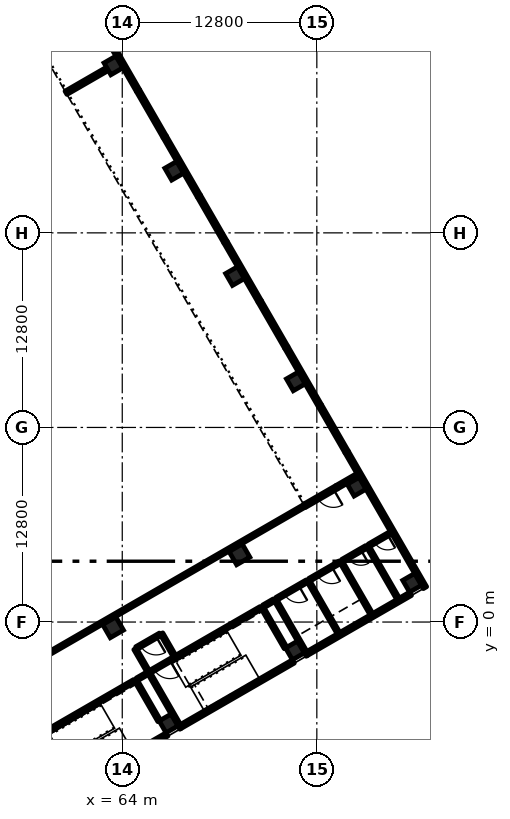
"""IFC4 building model, lengths in metres.
Left out: names, types, materials, properties, quantities, classifications, styles, units other than length and angle.
Written with IfcOpenShell. Run it as: python <this file> out.ifc"""

import sys

from ifc_helpers import new_model, si_unit, direction, frame, frame_2d, origin, origin_2d, place, context, subcontext, project, spatial, rectangle, extrude, element, fill, save


model = new_model("IFC4")
c1 = context("Model", 3, precision=1e-05, world=origin(), true_north=direction((0.0, 1.0)))
c2 = subcontext(c1, "Body", "Model", "MODEL_VIEW")
j1 = project(units=[si_unit("LENGTHUNIT", "METRE"), si_unit("PLANEANGLEUNIT", "RADIAN")], contexts=[c1])
p1 = place(None, origin())
s1 = spatial("IfcSite", under=j1, at=p1, CompositionType="ELEMENT")
p2 = place(p1, origin())
s2 = spatial("IfcBuilding", under=s1, at=p2, CompositionType="ELEMENT")
p3 = place(p2, frame((0.0, 0.0, 11.4)))
s3 = spatial("IfcBuildingStorey", under=s2, at=p3, CompositionType="ELEMENT", Elevation=11.4)
for number, where, z_axis, x_axis in (
    (1, (67.046, -6.671, 0.0), (0.0, 0.0, 1.0), (-0.5, 0.866, 0.0)),
    (2, (75.36, -1.871, 0.0), (0.0, 0.0, 1.0), (-0.5, 0.866, 0.0)),
    (3, (83.067, 2.579, 0.0), (0.0, 0.0, 1.0), (-0.5, 0.866, 0.0)),
):
    element("IfcColumn", number, at=place(p3, frame(where, z_axis=z_axis, x_axis=x_axis)), inside=s3, PredefinedType="COLUMN", context=c2, shape_type="SweptSolid", body=[
        extrude(rectangle(XDim=0.9, YDim=0.9, at=origin_2d()), origin(), (0.0, 0.0, 1.0), 4.8),
    ])
for number, where, z_axis, x_axis in (
    (4, (63.396, -0.349, 0.0), (0.0, 0.0, 1.0), (-0.5, 0.866, 0.0)),
    (5, (71.71, 4.451, 0.0), (0.0, 0.0, 1.0), (-0.5, 0.866, 0.0)),
):
    element("IfcColumn", number, at=place(p3, frame(where, z_axis=z_axis, x_axis=x_axis)), inside=s3, PredefinedType="COLUMN", context=c2, shape_type="SweptSolid", body=[
        extrude(rectangle(XDim=1.0, YDim=1.0, at=origin_2d()), origin(), (0.0, 0.0, 1.0), 4.8),
    ])
for number, where, z_axis, x_axis in (
    (6, (79.417, 8.901, 0.0), (0.0, 0.0, 1.0), (-0.5, 0.866, 0.0)),
    (7, (75.417, 15.829, 0.0), (0.0, 0.0, 1.0), (-0.5, 0.866, 0.0)),
    (8, (71.417, 22.758, 0.0), (0.0, 0.0, 1.0), (-0.5, 0.866, 0.0)),
    (9, (67.417, 29.686, 0.0), (0.0, 0.0, 1.0), (-0.5, 0.866, 0.0)),
    (10, (63.417, 36.614, 0.0), (0.0, 0.0, 1.0), (-0.5, 0.866, 0.0)),
):
    element("IfcColumn", number, at=place(p3, frame(where, z_axis=z_axis, x_axis=x_axis)), inside=s3, PredefinedType="COLUMN", context=c2, shape_type="SweptSolid", body=[
        extrude(rectangle(XDim=0.9, YDim=0.9, at=origin_2d()), origin(), (0.0, 0.0, 1.0), 4.8),
    ])
p4 = place(p2, frame((0.0, 0.0, 6.0)))
s4 = spatial("IfcBuildingStorey", under=s2, at=p4, CompositionType="ELEMENT", Elevation=6.0)
p5 = place(p4, frame((26.178, 15.114, 0.0), z_axis=(0.0, 0.0, 1.0), x_axis=(0.866025540551, 0.499999763114, 0.0)))
e11 = element("IfcWall", 11, at=p5, inside=s4, PredefinedType="SOLIDWALL", context=c2, shape_type="SweptSolid", body=[
    extrude(rectangle(XDim=39.4, YDim=0.25, at=frame_2d((19.7, 0.0))), origin(), (0.0, 0.0, 1.0), 10.2),
])
p6 = place(p3, frame((78.759, 11.191, 0.0), z_axis=(0.0, 0.0, 1.0), x_axis=(0.500001855621, -0.866024332438, 0.0)))
e12 = element("IfcWall", 12, at=p6, inside=s3, PredefinedType="SOLIDWALL", context=c2, shape_type="SweptSolid", body=[
    extrude(rectangle(XDim=10.312, YDim=0.25, at=frame_2d((5.156, 0.0))), origin(), (0.0, 0.0, 1.0), 4.5),
])
p7 = place(p3, frame((77.009, 14.222, 0.0), z_axis=(0.0, 0.0, 1.0), x_axis=(0.500010275428, -0.866019471182, 0.0)))
e13 = element("IfcWall", 13, at=p7, inside=s3, PredefinedType="SOLIDWALL", context=c2, shape_type="SweptSolid", body=[
    extrude(rectangle(XDim=3.5, YDim=0.25, at=frame_2d((1.75, 0.0))), origin(), (0.0, 0.0, 1.0), 4.5),
])
p8 = place(p7, frame((0.25, 0.0, 0.9)))
e14 = element("IfcOpeningElement", 14, at=p8, cuts=e13, PredefinedType="OPENING", context=c2, shape_type="SweptSolid", body=[
    extrude(rectangle(XDim=3.0, YDim=2.2, at=frame_2d((1.5, 1.1))), frame((0.0, 0.135, 0.0), z_axis=(0.0, -1.0, 0.0), x_axis=(1.0, 0.0, 0.0)), (0.0, 0.0, 1.0), 0.27),
])
p9 = place(p3, frame((74.79, 18.065, 0.0), z_axis=(0.0, 0.0, 1.0), x_axis=(0.499990705068, -0.866030770149, 0.0)))
e15 = element("IfcWall", 15, at=p9, inside=s3, PredefinedType="SOLIDWALL", context=c2, shape_type="SweptSolid", body=[
    extrude(rectangle(XDim=4.438, YDim=0.25, at=frame_2d((2.219, 0.0))), origin(), (0.0, 0.0, 1.0), 4.5),
])
p10 = place(p3, frame((73.04, 21.097, 0.0), z_axis=(0.0, 0.0, 1.0), x_axis=(0.499980071345, -0.866036909293, 0.0)))
e16 = element("IfcWall", 16, at=p10, inside=s3, PredefinedType="SOLIDWALL", context=c2, shape_type="SweptSolid", body=[
    extrude(rectangle(XDim=3.5, YDim=0.25, at=frame_2d((1.75, 0.0))), origin(), (0.0, 0.0, 1.0), 4.5),
])
p11 = place(p10, frame((0.25, 0.0, 0.9)))
e17 = element("IfcOpeningElement", 17, at=p11, cuts=e16, PredefinedType="OPENING", context=c2, shape_type="SweptSolid", body=[
    extrude(rectangle(XDim=3.0, YDim=2.2, at=frame_2d((1.5, 1.1))), frame((0.0, 0.135, 0.0), z_axis=(0.0, -1.0, 0.0), x_axis=(1.0, 0.0, 0.0)), (0.0, 0.0, 1.0), 0.27),
])
p12 = place(p3, frame((70.79, 24.994, 0.0), z_axis=(0.0, 0.0, 1.0), x_axis=(0.500013631625, -0.866017533419, 0.0)))
e18 = element("IfcWall", 18, at=p12, inside=s3, PredefinedType="SOLIDWALL", context=c2, shape_type="SweptSolid", body=[
    extrude(rectangle(XDim=4.5, YDim=0.25, at=frame_2d((2.25, 0.0))), origin(), (0.0, 0.0, 1.0), 4.5),
])
p13 = place(p3, frame((69.04, 28.025, 0.0), z_axis=(0.0, 0.0, 1.0), x_axis=(0.499980071345, -0.866036909293, 0.0)))
e19 = element("IfcWall", 19, at=p13, inside=s3, PredefinedType="SOLIDWALL", context=c2, shape_type="SweptSolid", body=[
    extrude(rectangle(XDim=3.5, YDim=0.25, at=frame_2d((1.75, 0.0))), origin(), (0.0, 0.0, 1.0), 4.5),
])
p14 = place(p13, frame((0.25, 0.0, 0.9)))
e20 = element("IfcOpeningElement", 20, at=p14, cuts=e19, PredefinedType="OPENING", context=c2, shape_type="SweptSolid", body=[
    extrude(rectangle(XDim=3.0, YDim=2.2, at=frame_2d((1.5, 1.1))), frame((0.0, 0.135, 0.0), z_axis=(0.0, -1.0, 0.0), x_axis=(1.0, 0.0, 0.0)), (0.0, 0.0, 1.0), 0.27),
])
p15 = place(p3, frame((66.79, 31.922, 0.0), z_axis=(0.0, 0.0, 1.0), x_axis=(0.500013631625, -0.866017533419, 0.0)))
e21 = element("IfcWall", 21, at=p15, inside=s3, PredefinedType="SOLIDWALL", context=c2, shape_type="SweptSolid", body=[
    extrude(rectangle(XDim=4.5, YDim=0.25, at=frame_2d((2.25, 0.0))), origin(), (0.0, 0.0, 1.0), 4.5),
])
p16 = place(p3, frame((65.04, 34.953, 0.0), z_axis=(0.0, 0.0, 1.0), x_axis=(0.500010275428, -0.866019471182, 0.0)))
e22 = element("IfcWall", 22, at=p16, inside=s3, PredefinedType="SOLIDWALL", context=c2, shape_type="SweptSolid", body=[
    extrude(rectangle(XDim=3.5, YDim=0.25, at=frame_2d((1.75, 0.0))), origin(), (0.0, 0.0, 1.0), 4.5),
])
p17 = place(p16, frame((0.25, 0.0, 0.9)))
e23 = element("IfcOpeningElement", 23, at=p17, cuts=e22, PredefinedType="OPENING", context=c2, shape_type="SweptSolid", body=[
    extrude(rectangle(XDim=3.0, YDim=2.2, at=frame_2d((1.5, 1.1))), frame((0.0, 0.135, 0.0), z_axis=(0.0, -1.0, 0.0), x_axis=(1.0, 0.0, 0.0)), (0.0, 0.0, 1.0), 0.27),
])
p18 = place(p3, frame((62.79, 38.85, 0.0), z_axis=(0.0, 0.0, 1.0), x_axis=(0.499990139034, -0.866031096941, 0.0)))
e24 = element("IfcWall", 24, at=p18, inside=s3, PredefinedType="SOLIDWALL", context=c2, shape_type="SweptSolid", body=[
    extrude(rectangle(XDim=4.5, YDim=0.25, at=frame_2d((2.25, 0.0))), origin(), (0.0, 0.0, 1.0), 4.5),
])
p19 = place(p3, frame((66.944, -7.394, 0.0), z_axis=(0.0, 0.0, 1.0), x_axis=(-0.866033360935, -0.499986217557, 0.0)))
e25 = element("IfcWall", 25, at=p19, inside=s3, PredefinedType="SOLIDWALL", context=c2, shape_type="SweptSolid", body=[
    extrude(rectangle(XDim=8.6, YDim=0.25, at=frame_2d((4.3, 0.0))), origin(), (0.0, 0.0, 1.0), 4.5),
])
p20 = place(p3, frame((75.258, -2.594, 0.0), z_axis=(0.0, 0.0, 1.0), x_axis=(-0.866028165386, -0.499995216735, 0.0)))
e26 = element("IfcWall", 26, at=p20, inside=s3, PredefinedType="SOLIDWALL", context=c2, shape_type="SweptSolid", body=[
    extrude(rectangle(XDim=8.6, YDim=0.25, at=frame_2d((4.3, 0.0))), origin(), (0.0, 0.0, 1.0), 4.5),
])
p21 = place(p3, frame((82.965, 1.856, 0.0), z_axis=(0.0, 0.0, 1.0), x_axis=(-0.866026562566, -0.499997992926, 0.0)))
e27 = element("IfcWall", 27, at=p21, inside=s3, PredefinedType="SOLIDWALL", context=c2, shape_type="SweptSolid", body=[
    extrude(rectangle(XDim=7.9, YDim=0.25, at=frame_2d((3.95, 0.0))), origin(), (0.0, 0.0, 1.0), 4.5),
])
p22 = place(p3, frame((67.81, -6.894, 0.0), z_axis=(0.0, 0.0, 1.0), x_axis=(-0.867038199201, -0.4982416694, 0.0)))
e28 = element("IfcWall", 28, at=p22, inside=s3, PredefinedType="SOLIDWALL", context=c2, shape_type="SweptSolid", body=[
    extrude(rectangle(XDim=0.1, YDim=0.25, at=frame_2d((0.05, 0.0))), origin(), (0.0, 0.0, 1.0), 4.5),
])
p23 = place(p3, frame((76.124, -2.094, 0.0), z_axis=(0.0, 0.0, 1.0), x_axis=(-0.865982457891, -0.500074377092, 0.0)))
e29 = element("IfcWall", 29, at=p23, inside=s3, PredefinedType="SOLIDWALL", context=c2, shape_type="SweptSolid", body=[
    extrude(rectangle(XDim=0.1, YDim=0.25, at=frame_2d((0.05, 0.0))), origin(), (0.0, 0.0, 1.0), 4.5),
])
p24 = place(p3, frame((66.431, -6.506, 0.0), z_axis=(0.0, 0.0, 1.0), x_axis=(-0.49999285859, 0.86602952684, 0.0)))
e30 = element("IfcWall", 30, at=p24, inside=s3, PredefinedType="SOLIDWALL", context=c2, shape_type="SweptSolid", body=[
    extrude(rectangle(XDim=3.1, YDim=0.2, at=frame_2d((1.55, 0.0))), origin(), (0.0, 0.0, 1.0), 4.5),
])
p25 = place(p3, frame((67.747, -6.785, 0.0), z_axis=(0.0, 0.0, 1.0), x_axis=(-0.49999894854, 0.866026010844, 0.0)))
e31 = element("IfcWall", 31, at=p25, inside=s3, PredefinedType="SOLIDWALL", context=c2, shape_type="SweptSolid", body=[
    extrude(rectangle(XDim=4.0, YDim=0.2, at=frame_2d((2.0, 0.0))), origin(), (0.0, 0.0, 1.0), 4.5),
])
p26 = place(p3, frame((74.745, -1.706, 0.0), z_axis=(0.0, 0.0, 1.0), x_axis=(-0.500026960575, 0.86600983753, 0.0)))
e32 = element("IfcWall", 32, at=p26, inside=s3, PredefinedType="SOLIDWALL", context=c2, shape_type="SweptSolid", body=[
    extrude(rectangle(XDim=3.1, YDim=0.2, at=frame_2d((1.55, 0.0))), origin(), (0.0, 0.0, 1.0), 4.5),
])
p27 = place(p3, frame((59.035, -7.196, 0.0), z_axis=(0.0, 0.0, 1.0), x_axis=(0.866027239912, 0.49999681972, 0.0)))
e33 = element("IfcWall", 33, at=p27, inside=s3, PredefinedType="SOLIDWALL", context=c2, shape_type="SweptSolid", body=[
    extrude(rectangle(XDim=6.65, YDim=0.2, at=frame_2d((3.325, 0.0))), origin(), (0.0, 0.0, 1.0), 4.5),
])
p28 = place(p3, frame((67.349, -2.396, 0.0), z_axis=(0.0, 0.0, 1.0), x_axis=(-0.866036909293, -0.499980071345, 0.0)))
e34 = element("IfcWall", 34, at=p28, inside=s3, PredefinedType="SOLIDWALL", context=c2, shape_type="SweptSolid", body=[
    extrude(rectangle(XDim=1.75, YDim=0.2, at=frame_2d((0.875, 0.0))), origin(), (0.0, 0.0, 1.0), 4.5),
])
p29 = place(p28, frame((0.25, 0.0, 0.0)))
e35 = element("IfcOpeningElement", 35, at=p29, cuts=e34, PredefinedType="OPENING", context=c2, shape_type="SweptSolid", body=[
    extrude(rectangle(XDim=1.2, YDim=2.1, at=frame_2d((0.6, 1.05))), frame((0.0, 0.11, 0.0), z_axis=(0.0, -1.0, 0.0), x_axis=(1.0, 0.0, 0.0)), (0.0, 0.0, 1.0), 0.22),
])
p30 = place(p3, frame((67.349, -2.396, 0.0), z_axis=(0.0, 0.0, 1.0), x_axis=(0.86601134256, 0.500024353964, 0.0)))
e36 = element("IfcWall", 36, at=p30, inside=s3, PredefinedType="SOLIDWALL", context=c2, shape_type="SweptSolid", body=[
    extrude(rectangle(XDim=6.65, YDim=0.2, at=frame_2d((3.325, 0.0))), origin(), (0.0, 0.0, 1.0), 4.5),
])
for number, where, z_axis, x_axis in (
    (37, (76.061, -1.986, 0.0), (0.0, 0.0, 1.0), (-0.5, 0.866, 0.0)),
    (38, (78.226, -0.736, 0.0), (0.0, 0.0, 1.0), (-0.5, 0.866, 0.0)),
    (39, (80.391, 0.514, 0.0), (0.0, 0.0, 1.0), (-0.5, 0.866, 0.0)),
):
    element("IfcWall", number, at=place(p3, frame(where, z_axis=z_axis, x_axis=x_axis)), inside=s3, PredefinedType="SOLIDWALL", context=c2, shape_type="SweptSolid", body=[
        extrude(rectangle(XDim=4.0, YDim=0.2, at=frame_2d((2.0, 0.0))), origin(), (0.0, 0.0, 1.0), 4.5),
    ])
p31 = place(p3, frame((76.139, 2.679, 0.0), z_axis=(0.0, 0.0, 1.0), x_axis=(-0.865980515519, -0.500077740698, 0.0)))
e40 = element("IfcWall", 40, at=p31, inside=s3, PredefinedType="SOLIDWALL", context=c2, shape_type="SweptSolid", body=[
    extrude(rectangle(XDim=2.3, YDim=0.2, at=frame_2d((1.15, 0.0))), origin(), (0.0, 0.0, 1.0), 4.5),
])
p32 = place(p31, frame((0.6, 0.0, 0.0)))
e41 = element("IfcOpeningElement", 41, at=p32, cuts=e40, PredefinedType="OPENING", context=c2, shape_type="SweptSolid", body=[
    extrude(rectangle(XDim=1.1, YDim=2.1, at=frame_2d((0.55, 1.05))), frame((0.0, 0.11, 0.0), z_axis=(0.0, -1.0, 0.0), x_axis=(1.0, 0.0, 0.0)), (0.0, 0.0, 1.0), 0.22),
])
p33 = place(p3, frame((78.304, 3.929, 0.0), z_axis=(0.0, 0.0, 1.0), x_axis=(-0.865980515519, -0.500077740698, 0.0)))
e42 = element("IfcWall", 42, at=p33, inside=s3, PredefinedType="SOLIDWALL", context=c2, shape_type="SweptSolid", body=[
    extrude(rectangle(XDim=2.3, YDim=0.2, at=frame_2d((1.15, 0.0))), origin(), (0.0, 0.0, 1.0), 4.5),
])
p34 = place(p33, frame((0.6, 0.0, 0.0)))
e43 = element("IfcOpeningElement", 43, at=p34, cuts=e42, PredefinedType="OPENING", context=c2, shape_type="SweptSolid", body=[
    extrude(rectangle(XDim=1.1, YDim=2.1, at=frame_2d((0.55, 1.05))), frame((0.0, 0.11, 0.0), z_axis=(0.0, -1.0, 0.0), x_axis=(1.0, 0.0, 0.0)), (0.0, 0.0, 1.0), 0.22),
])
p35 = place(p3, frame((65.697, -3.235, 0.0), z_axis=(0.0, 0.0, 1.0), x_axis=(-0.499892348375, 0.866087547558, 0.0)))
e44 = element("IfcWall", 44, at=p35, inside=s3, PredefinedType="PARTITIONING", context=c2, shape_type="SweptSolid", body=[
    extrude(rectangle(XDim=1.7, YDim=0.2, at=frame_2d((0.85, 0.0))), origin(), (0.0, 0.0, 1.0), 3.9),
])
p36 = place(p3, frame((67.429, -2.235, 0.0), z_axis=(0.0, 0.0, 1.0), x_axis=(-0.500000056704, 0.866025371046, 0.0)))
e45 = element("IfcWall", 45, at=p36, inside=s3, PredefinedType="PARTITIONING", context=c2, shape_type="SweptSolid", body=[
    extrude(rectangle(XDim=1.7, YDim=0.2, at=frame_2d((0.85, 0.0))), origin(), (0.0, 0.0, 1.0), 3.9),
])
p37 = place(p3, frame((66.493, -0.812, 0.0), z_axis=(0.0, 0.0, 1.0), x_axis=(-0.866081705922, -0.499902469156, 0.0)))
e46 = element("IfcWall", 46, at=p37, inside=s3, PredefinedType="PARTITIONING", context=c2, shape_type="SweptSolid", body=[
    extrude(rectangle(XDim=1.8, YDim=0.2, at=frame_2d((0.9, 0.0))), origin(), (0.0, 0.0, 1.0), 3.9),
])
p38 = place(p37, frame((0.3, 0.0, 0.0)))
e47 = element("IfcOpeningElement", 47, at=p38, cuts=e46, PredefinedType="OPENING", context=c2, shape_type="SweptSolid", body=[
    extrude(rectangle(XDim=1.2, YDim=2.1, at=frame_2d((0.6, 1.05))), frame((0.0, 0.11, 0.0), z_axis=(0.0, -1.0, 0.0), x_axis=(1.0, 0.0, 0.0)), (0.0, 0.0, 1.0), 0.22),
])
p39 = place(p3, frame((78.109, 8.867, 0.0), z_axis=(0.0, 0.0, 1.0), x_axis=(-0.866057815567, -0.499943856944, 0.0)))
e48 = element("IfcWall", 48, at=p39, inside=s3, PredefinedType="SOLIDWALL", context=c2, shape_type="SweptSolid", body=[
    extrude(rectangle(XDim=2.45, YDim=0.25, at=frame_2d((1.225, 0.0))), origin(), (0.0, 0.0, 1.0), 3.9),
])
p40 = place(p39, frame((0.25, 0.0, 0.0)))
e49 = element("IfcOpeningElement", 49, at=p40, cuts=e48, PredefinedType="OPENING", context=c2, shape_type="SweptSolid", body=[
    extrude(rectangle(XDim=1.2, YDim=2.1, at=frame_2d((0.6, 1.05))), frame((0.0, 0.135, 0.0), z_axis=(0.0, -1.0, 0.0), x_axis=(1.0, 0.0, 0.0)), (0.0, 0.0, 1.0), 0.27),
])
p41 = place(p3, frame((78.109, 8.867, 0.0), z_axis=(0.0, 0.0, 1.0), x_axis=(0.865989903783, 0.500061482766, 0.0)))
e50 = element("IfcWall", 50, at=p41, inside=s3, PredefinedType="SOLIDWALL", context=c2, shape_type="SweptSolid", body=[
    extrude(rectangle(XDim=1.6, YDim=0.25, at=frame_2d((0.8, 0.0))), origin(), (0.0, 0.0, 1.0), 3.9),
])
p42 = place(p3, frame((60.3, 34.814, 0.0), z_axis=(0.0, 0.0, 1.0), x_axis=(0.866035871367, 0.499981869177, 0.0)))
e51 = element("IfcWall", 51, at=p42, inside=s3, PredefinedType="SOLIDWALL", context=c2, shape_type="SweptSolid", body=[
    extrude(rectangle(XDim=3.15, YDim=0.25, at=frame_2d((1.575, 0.0))), origin(), (0.0, 0.0, 1.0), 3.9),
])
p43 = place(p3, frame((82.145, 1.527, 0.0), z_axis=(0.0, 0.0, 1.0), x_axis=(-0.49999894854, 0.866026010844, 0.0)))
e52 = element("IfcWall", 52, at=p43, inside=s3, PredefinedType="PARTITIONING", context=c2, shape_type="SweptSolid", body=[
    extrude(rectangle(XDim=4.0, YDim=0.2, at=frame_2d((2.0, 0.0))), origin(), (0.0, 0.0, 1.0), 3.9),
])
p44 = place(p3, frame((80.058, 4.941, 0.0), z_axis=(0.0, 0.0, 1.0), x_axis=(-0.865978377894, -0.500081442387, 0.0)))
e53 = element("IfcWall", 53, at=p44, inside=s3, PredefinedType="PARTITIONING", context=c2, shape_type="SweptSolid", body=[
    extrude(rectangle(XDim=1.825, YDim=0.2, at=frame_2d((0.913, 0.0))), origin(), (0.0, 0.0, 1.0), 3.9),
])
p45 = place(p44, frame((0.413, 0.0, 0.0)))
e54 = element("IfcOpeningElement", 54, at=p45, cuts=e53, PredefinedType="OPENING", context=c2, shape_type="SweptSolid", body=[
    extrude(rectangle(XDim=1.0, YDim=2.1, at=frame_2d((0.5, 1.05))), frame((0.0, 0.11, 0.0), z_axis=(0.0, -1.0, 0.0), x_axis=(1.0, 0.0, 0.0)), (0.0, 0.0, 1.0), 0.22),
])
p46 = place(p3, frame((81.682, 5.879, 0.0), z_axis=(0.0, 0.0, 1.0), x_axis=(-0.865964676353, -0.500105168249, 0.0)))
e55 = element("IfcWall", 55, at=p46, inside=s3, PredefinedType="PARTITIONING", context=c2, shape_type="SweptSolid", body=[
    extrude(rectangle(XDim=1.675, YDim=0.2, at=frame_2d((0.837, 0.0))), origin(), (0.0, 0.0, 1.0), 3.9),
])
p47 = place(p46, frame((0.262, 0.0, 0.0)))
e56 = element("IfcOpeningElement", 56, at=p47, cuts=e55, PredefinedType="OPENING", context=c2, shape_type="SweptSolid", body=[
    extrude(rectangle(XDim=1.0, YDim=2.1, at=frame_2d((0.5, 1.05))), frame((0.0, 0.11, 0.0), z_axis=(0.0, -1.0, 0.0), x_axis=(1.0, 0.0, 0.0)), (0.0, 0.0, 1.0), 0.22),
])
p48 = place(p3, frame((64.968, -3.771, 0.0), z_axis=(0.0, 0.0, 1.0), x_axis=(0.865885638426, 0.500242002602, 0.0)))
e57 = element("IfcWall", 57, at=p48, inside=s3, PredefinedType="PARTITIONING", context=c2, shape_type="SweptSolid", body=[
    extrude(rectangle(XDim=0.8, YDim=0.2, at=frame_2d((0.4, 0.0))), origin(), (0.0, 0.0, 1.0), 3.9),
])
p49 = place(p3, frame((73.281, 1.029, 0.0), z_axis=(0.0, 0.0, 1.0), x_axis=(0.865961984968, 0.500109828528, 0.0)))
e58 = element("IfcWall", 58, at=p49, inside=s3, PredefinedType="PARTITIONING", context=c2, shape_type="SweptSolid", body=[
    extrude(rectangle(XDim=0.8, YDim=0.2, at=frame_2d((0.4, 0.0))), origin(), (0.0, 0.0, 1.0), 3.9),
])
p50 = place(p3, frame((41.866, -12.058, 0.0), z_axis=(0.0, 0.0, 1.0), x_axis=(0.866022857395, 0.50000441045, 0.0)))
e59 = element("IfcWall", 59, at=p50, inside=s3, PredefinedType="PARTITIONING", context=c2, shape_type="SweptSolid", body=[
    extrude(rectangle(XDim=39.4, YDim=0.2, at=frame_2d((19.7, 0.0))), origin(), (0.0, 0.0, 1.0), 3.9),
])
p51 = place(p8, origin())
e60 = element("IfcWindow", 60, at=p51, inside=s3, PartitioningType="SINGLE_PANEL", PredefinedType="WINDOW", context=c2, shape_type="SweptSolid", body=[
    extrude(rectangle(XDim=3.0, YDim=2.2, at=frame_2d((1.5, 1.1))), frame((0.0, 0.03, 0.0), z_axis=(0.0, -1.0, 0.0), x_axis=(1.0, 0.0, 0.0)), (0.0, 0.0, 1.0), 0.06),
])
fill(e14, e60)
p52 = place(p11, origin())
e61 = element("IfcWindow", 61, at=p52, inside=s3, PartitioningType="SINGLE_PANEL", PredefinedType="WINDOW", context=c2, shape_type="SweptSolid", body=[
    extrude(rectangle(XDim=3.0, YDim=2.2, at=frame_2d((1.5, 1.1))), frame((0.0, 0.03, 0.0), z_axis=(0.0, -1.0, 0.0), x_axis=(1.0, 0.0, 0.0)), (0.0, 0.0, 1.0), 0.06),
])
fill(e17, e61)
p53 = place(p14, origin())
e62 = element("IfcWindow", 62, at=p53, inside=s3, PartitioningType="SINGLE_PANEL", PredefinedType="WINDOW", context=c2, shape_type="SweptSolid", body=[
    extrude(rectangle(XDim=3.0, YDim=2.2, at=frame_2d((1.5, 1.1))), frame((0.0, 0.03, 0.0), z_axis=(0.0, -1.0, 0.0), x_axis=(1.0, 0.0, 0.0)), (0.0, 0.0, 1.0), 0.06),
])
fill(e20, e62)
p54 = place(p17, origin())
e63 = element("IfcWindow", 63, at=p54, inside=s3, PartitioningType="SINGLE_PANEL", PredefinedType="WINDOW", context=c2, shape_type="SweptSolid", body=[
    extrude(rectangle(XDim=3.0, YDim=2.2, at=frame_2d((1.5, 1.1))), frame((0.0, 0.03, 0.0), z_axis=(0.0, -1.0, 0.0), x_axis=(1.0, 0.0, 0.0)), (0.0, 0.0, 1.0), 0.06),
])
fill(e23, e63)
p55 = place(p29, origin())
e64 = element("IfcDoor", 64, at=p55, inside=s3, OperationType="SINGLE_SWING_LEFT", PredefinedType="DOOR", context=c2, shape_type="SweptSolid", body=[
    extrude(rectangle(XDim=1.2, YDim=2.1, at=frame_2d((0.6, 1.05))), frame((0.0, 0.025, 0.0), z_axis=(0.0, -1.0, 0.0), x_axis=(1.0, 0.0, 0.0)), (0.0, 0.0, 1.0), 0.05),
])
fill(e35, e64)
p56 = place(p32, origin())
e65 = element("IfcDoor", 65, at=p56, inside=s3, OperationType="DOUBLE_DOOR_SLIDING", PredefinedType="DOOR", context=c2, shape_type="SweptSolid", body=[
    extrude(rectangle(XDim=1.1, YDim=2.1, at=frame_2d((0.55, 1.05))), frame((0.0, 0.025, 0.0), z_axis=(0.0, -1.0, 0.0), x_axis=(1.0, 0.0, 0.0)), (0.0, 0.0, 1.0), 0.05),
])
fill(e41, e65)
p57 = place(p34, origin())
e66 = element("IfcDoor", 66, at=p57, inside=s3, OperationType="DOUBLE_DOOR_SLIDING", PredefinedType="DOOR", context=c2, shape_type="SweptSolid", body=[
    extrude(rectangle(XDim=1.1, YDim=2.1, at=frame_2d((0.55, 1.05))), frame((0.0, 0.025, 0.0), z_axis=(0.0, -1.0, 0.0), x_axis=(1.0, 0.0, 0.0)), (0.0, 0.0, 1.0), 0.05),
])
fill(e43, e66)
p58 = place(p38, origin())
e67 = element("IfcDoor", 67, at=p58, inside=s3, OperationType="SINGLE_SWING_LEFT", PredefinedType="DOOR", context=c2, shape_type="SweptSolid", body=[
    extrude(rectangle(XDim=1.2, YDim=2.1, at=frame_2d((0.6, 1.05))), frame((0.0, 0.025, 0.0), z_axis=(0.0, -1.0, 0.0), x_axis=(1.0, 0.0, 0.0)), (0.0, 0.0, 1.0), 0.05),
])
fill(e47, e67)
p59 = place(p40, origin())
e68 = element("IfcDoor", 68, at=p59, inside=s3, OperationType="SINGLE_SWING_LEFT", PredefinedType="DOOR", context=c2, shape_type="SweptSolid", body=[
    extrude(rectangle(XDim=1.2, YDim=2.1, at=frame_2d((0.6, 1.05))), frame((0.0, 0.025, 0.0), z_axis=(0.0, -1.0, 0.0), x_axis=(1.0, 0.0, 0.0)), (0.0, 0.0, 1.0), 0.05),
])
fill(e49, e68)
p60 = place(p45, origin())
e69 = element("IfcDoor", 69, at=p60, inside=s3, OperationType="SINGLE_SWING_LEFT", PredefinedType="DOOR", context=c2, shape_type="SweptSolid", body=[
    extrude(rectangle(XDim=1.0, YDim=2.1, at=frame_2d((0.5, 1.05))), frame((0.0, 0.025, 0.0), z_axis=(0.0, -1.0, 0.0), x_axis=(1.0, 0.0, 0.0)), (0.0, 0.0, 1.0), 0.05),
])
fill(e54, e69)
p61 = place(p47, origin())
e70 = element("IfcDoor", 70, at=p61, inside=s3, OperationType="SINGLE_SWING_LEFT", PredefinedType="DOOR", context=c2, shape_type="SweptSolid", body=[
    extrude(rectangle(XDim=1.0, YDim=2.1, at=frame_2d((0.5, 1.05))), frame((0.0, 0.025, 0.0), z_axis=(0.0, -1.0, 0.0), x_axis=(1.0, 0.0, 0.0)), (0.0, 0.0, 1.0), 0.05),
])
fill(e56, e70)
save(model, sys.argv[1])
